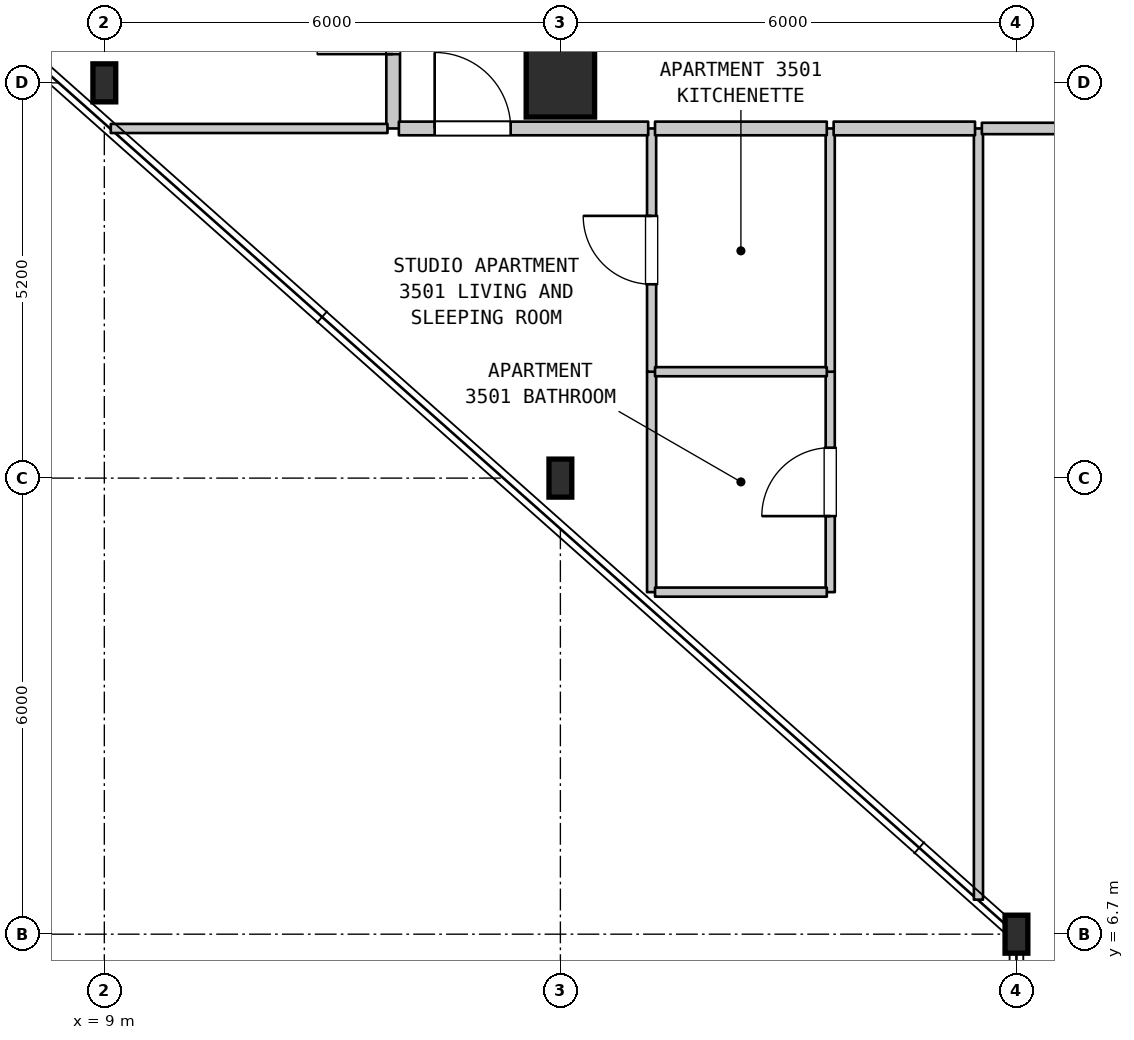
"""IFC4 building model, lengths in metres.
Left out: names, types, materials, properties, quantities, classifications, styles, units other than length and angle.
Written with IfcOpenShell. Run it as: python <this file> out.ifc"""

import sys

from ifc_helpers import new_model, si_unit, direction, frame, frame_2d, origin, origin_2d, place, context, subcontext, project, spatial, rectangle, i_section, extrude, element, fill, save


model = new_model("IFC4")
c1 = context("Model", 3, precision=1e-05, world=origin(), true_north=direction((0.0, 1.0)))
c2 = subcontext(c1, "Body", "Model", "MODEL_VIEW")
j1 = project(units=[si_unit("LENGTHUNIT", "METRE"), si_unit("PLANEANGLEUNIT", "RADIAN")], contexts=[c1])
p1 = place(None, origin())
s1 = spatial("IfcSite", under=j1, at=p1, CompositionType="ELEMENT")
p2 = place(p1, origin())
s2 = spatial("IfcBuilding", under=s1, at=p2, CompositionType="ELEMENT")
p3 = place(p2, frame((0.0, 0.0, 144.6)))
s3 = spatial("IfcBuildingStorey", under=s2, at=p3, CompositionType="ELEMENT", Elevation=144.6)
for number, where, z_axis, x_axis in (
    (1, (9.0, 17.9, 0.0), (0.0, 0.0, 1.0), (1.0, 0.0, 0.0)),
    (2, (15.0, 12.7, 0.0), (0.0, 0.0, 1.0), (1.0, 0.0, 0.0)),
):
    element("IfcColumn", number, at=place(p3, frame(where, z_axis=z_axis, x_axis=x_axis)), inside=s3, PredefinedType="COLUMN", context=c2, shape_type="SweptSolid", body=[
        extrude(i_section(OverallWidth=0.3, OverallDepth=0.5, WebThickness=0.014, FlangeThickness=0.028, FilletRadius=0.027, at=origin_2d()), origin(), (0.0, 0.0, 1.0), 3.7),
    ])
p4 = place(p3, frame((15.0, 17.9, 0.0), z_axis=(0.0, 0.0, 1.0), x_axis=(1.0, 0.0, 0.0)))
e3 = element("IfcColumn", 3, at=p4, inside=s3, PredefinedType="COLUMN", context=c2, shape_type="SweptSolid", body=[
    extrude(rectangle(XDim=0.9, YDim=0.9, at=origin_2d()), origin(), (0.0, 0.0, 1.0), 3.7),
])
p5 = place(p3, frame((21.0, 6.7, 0.0), z_axis=(0.0, 0.0, 1.0), x_axis=(1.0, 0.0, 0.0)))
e4 = element("IfcColumn", 4, at=p5, inside=s3, PredefinedType="COLUMN", context=c2, shape_type="SweptSolid", body=[
    extrude(i_section(OverallWidth=0.3, OverallDepth=0.5, WebThickness=0.014, FlangeThickness=0.028, FilletRadius=0.027, at=origin_2d()), origin(), (0.0, 0.0, 1.0), 3.7),
])
p6 = place(p3, frame((12.8, 17.3, 0.0), z_axis=(0.0, 0.0, 1.0), x_axis=(0.0, 1.0, 0.0)))
e5 = element("IfcWall", 5, at=p6, inside=s3, PredefinedType="STANDARD", context=c2, shape_type="SweptSolid", body=[
    extrude(rectangle(XDim=3.1, YDim=0.18, at=frame_2d((1.55, 0.0))), origin(), (0.0, 0.0, 1.0), 3.385),
])
p7 = place(p6, frame((0.978, 0.0, 0.0)))
e6 = element("IfcOpeningElement", 6, at=p7, cuts=e5, PredefinedType="OPENING", context=c2, shape_type="SweptSolid", body=[
    extrude(rectangle(XDim=1.0, YDim=2.15, at=frame_2d((0.5, 1.075))), frame((0.0, 0.1, 0.0), z_axis=(0.0, -1.0, 0.0), x_axis=(1.0, 0.0, 0.0)), (0.0, 0.0, 1.0), 0.2),
])
p8 = place(p3, frame((16.2, 11.2, 0.0), z_axis=(0.0, 0.0, 1.0), x_axis=(0.0, 1.0, 0.0)))
e7 = element("IfcWall", 7, at=p8, inside=s3, PredefinedType="PARTITIONING", context=c2, shape_type="SweptSolid", body=[
    extrude(rectangle(XDim=2.9, YDim=0.12, at=frame_2d((1.45, 0.0))), origin(), (0.0, 0.0, 1.0), 3.385),
])
p9 = place(p3, frame((16.2, 14.1, 0.0), z_axis=(0.0, 0.0, 1.0), x_axis=(0.0, 1.0, 0.0)))
e8 = element("IfcWall", 8, at=p9, inside=s3, PredefinedType="PARTITIONING", context=c2, shape_type="SweptSolid", body=[
    extrude(rectangle(XDim=3.2, YDim=0.12, at=frame_2d((1.6, 0.0))), origin(), (0.0, 0.0, 1.0), 3.385),
])
p10 = place(p9, frame((1.15, 0.0, 0.0)))
e9 = element("IfcOpeningElement", 9, at=p10, cuts=e8, PredefinedType="OPENING", context=c2, shape_type="SweptSolid", body=[
    extrude(rectangle(XDim=0.9, YDim=2.15, at=frame_2d((0.45, 1.075))), frame((0.0, 0.07, 0.0), z_axis=(0.0, -1.0, 0.0), x_axis=(1.0, 0.0, 0.0)), (0.0, 0.0, 1.0), 0.14),
])
p11 = place(p3, frame((18.55, 11.2, 0.0), z_axis=(0.0, 0.0, 1.0), x_axis=(0.0, 1.0, 0.0)))
e10 = element("IfcWall", 10, at=p11, inside=s3, PredefinedType="PARTITIONING", context=c2, shape_type="SweptSolid", body=[
    extrude(rectangle(XDim=2.9, YDim=0.12, at=frame_2d((1.45, 0.0))), origin(), (0.0, 0.0, 1.0), 3.385),
])
p12 = place(p11, frame((1.0, 0.0, 0.0)))
e11 = element("IfcOpeningElement", 11, at=p12, cuts=e10, PredefinedType="OPENING", context=c2, shape_type="SweptSolid", body=[
    extrude(rectangle(XDim=0.9, YDim=2.1, at=frame_2d((0.45, 1.05))), frame((0.0, 0.07, 0.0), z_axis=(0.0, -1.0, 0.0), x_axis=(1.0, 0.0, 0.0)), (0.0, 0.0, 1.0), 0.14),
])
p13 = place(p3, frame((18.55, 14.1, 0.0), z_axis=(0.0, 0.0, 1.0), x_axis=(0.0, 1.0, 0.0)))
e12 = element("IfcWall", 12, at=p13, inside=s3, PredefinedType="PARTITIONING", context=c2, shape_type="SweptSolid", body=[
    extrude(rectangle(XDim=3.2, YDim=0.12, at=frame_2d((1.6, 0.0))), origin(), (0.0, 0.0, 1.0), 3.385),
])
p14 = place(p3, frame((20.5, 7.154, 0.0), z_axis=(0.0, 0.0, 1.0), x_axis=(0.0, 1.0, 0.0)))
e13 = element("IfcWall", 13, at=p14, inside=s3, PredefinedType="PARTITIONING", context=c2, shape_type="SweptSolid", body=[
    extrude(rectangle(XDim=10.146, YDim=0.12, at=frame_2d((5.073, 0.0))), origin(), (0.0, 0.0, 1.0), 3.385),
])
for number, where, z_axis, x_axis in (
    (14, (16.245, 11.2, 0.0), (0.0, 0.0, 1.0), (1.0, 0.0, 0.0)),
    (15, (16.245, 14.1, 0.0), (0.0, 0.0, 1.0), (1.0, 0.0, 0.0)),
):
    element("IfcWall", number, at=place(p3, frame(where, z_axis=z_axis, x_axis=x_axis)), inside=s3, PredefinedType="PARTITIONING", context=c2, shape_type="SweptSolid", body=[
        extrude(rectangle(XDim=2.26, YDim=0.12, at=frame_2d((1.13, 0.0))), origin(), (0.0, 0.0, 1.0), 3.385),
    ])
p15 = place(p3, frame((9.085, 17.3, 0.0), z_axis=(0.0, 0.0, 1.0), x_axis=(1.0, 0.0, 0.0)))
e16 = element("IfcWall", 16, at=p15, inside=s3, PredefinedType="PARTITIONING", context=c2, shape_type="SweptSolid", body=[
    extrude(rectangle(XDim=3.64, YDim=0.12, at=frame_2d((1.82, 0.0))), origin(), (0.0, 0.0, 1.0), 3.385),
])
p16 = place(p3, frame((12.875, 17.3, 0.0), z_axis=(0.0, 0.0, 1.0), x_axis=(1.0, 0.0, 0.0)))
e17 = element("IfcWall", 17, at=p16, inside=s3, PredefinedType="STANDARD", context=c2, shape_type="SweptSolid", body=[
    extrude(rectangle(XDim=3.28, YDim=0.18, at=frame_2d((1.64, 0.0))), origin(), (0.0, 0.0, 1.0), 3.385),
])
p17 = place(p16, frame((0.471, 0.0, 0.0)))
e18 = element("IfcOpeningElement", 18, at=p17, cuts=e17, PredefinedType="OPENING", context=c2, shape_type="SweptSolid", body=[
    extrude(rectangle(XDim=1.0, YDim=2.15, at=frame_2d((0.5, 1.075))), frame((0.0, 0.1, 0.0), z_axis=(0.0, -1.0, 0.0), x_axis=(1.0, 0.0, 0.0)), (0.0, 0.0, 1.0), 0.2),
])
p18 = place(p3, frame((16.245, 17.3, 0.0), z_axis=(0.0, 0.0, 1.0), x_axis=(1.0, 0.0, 0.0)))
e19 = element("IfcWall", 19, at=p18, inside=s3, PredefinedType="STANDARD", context=c2, shape_type="SweptSolid", body=[
    extrude(rectangle(XDim=2.26, YDim=0.18, at=frame_2d((1.13, 0.0))), origin(), (0.0, 0.0, 1.0), 3.385),
])
p19 = place(p3, frame((18.595, 17.3, 0.0), z_axis=(0.0, 0.0, 1.0), x_axis=(1.0, 0.0, 0.0)))
e20 = element("IfcWall", 20, at=p19, inside=s3, PredefinedType="STANDARD", context=c2, shape_type="SweptSolid", body=[
    extrude(rectangle(XDim=1.86, YDim=0.18, at=frame_2d((0.93, 0.0))), origin(), (0.0, 0.0, 1.0), 3.385),
])
p20 = place(p3, frame((20.545, 17.3, 0.0), z_axis=(0.0, 0.0, 1.0), x_axis=(1.0, 0.0, 0.0)))
e21 = element("IfcWall", 21, at=p20, inside=s3, PredefinedType="STANDARD", context=c2, shape_type="SweptSolid", body=[
    extrude(rectangle(XDim=4.91, YDim=0.15, at=frame_2d((2.455, 0.0))), origin(), (0.0, 0.0, 1.0), 3.385),
])
p21 = place(p20, frame((1.884, 0.0, 0.0)))
e22 = element("IfcOpeningElement", 22, at=p21, cuts=e21, PredefinedType="OPENING", context=c2, shape_type="SweptSolid", body=[
    extrude(rectangle(XDim=1.0, YDim=2.15, at=frame_2d((0.5, 1.075))), frame((0.0, 0.085, 0.0), z_axis=(0.0, -1.0, 0.0), x_axis=(1.0, 0.0, 0.0)), (0.0, 0.0, 1.0), 0.17),
])
p22 = place(p7, origin())
e23 = element("IfcDoor", 23, at=p22, inside=s3, OperationType="SINGLE_SWING_LEFT", PredefinedType="DOOR", context=c2, shape_type="SweptSolid", body=[
    extrude(rectangle(XDim=1.0, YDim=2.15, at=frame_2d((0.5, 1.075))), frame((0.0, 0.025, 0.0), z_axis=(0.0, -1.0, 0.0), x_axis=(1.0, 0.0, 0.0)), (0.0, 0.0, 1.0), 0.05),
])
fill(e6, e23)
p23 = place(p10, origin())
e24 = element("IfcDoor", 24, at=p23, inside=s3, OperationType="SINGLE_SWING_RIGHT", PredefinedType="DOOR", context=c2, shape_type="SweptSolid", body=[
    extrude(rectangle(XDim=0.9, YDim=2.15, at=frame_2d((0.45, 1.075))), frame((0.0, 0.025, 0.0), z_axis=(0.0, -1.0, 0.0), x_axis=(1.0, 0.0, 0.0)), (0.0, 0.0, 1.0), 0.05),
])
fill(e9, e24)
p24 = place(p12, origin())
e25 = element("IfcDoor", 25, at=p24, inside=s3, OperationType="SINGLE_SWING_LEFT", PredefinedType="DOOR", context=c2, shape_type="SweptSolid", body=[
    extrude(rectangle(XDim=0.9, YDim=2.1, at=frame_2d((0.45, 1.05))), frame((0.0, 0.025, 0.0), z_axis=(0.0, -1.0, 0.0), x_axis=(1.0, 0.0, 0.0)), (0.0, 0.0, 1.0), 0.05),
])
fill(e11, e25)
p25 = place(p17, origin())
e26 = element("IfcDoor", 26, at=p25, inside=s3, OperationType="SINGLE_SWING_LEFT", PredefinedType="DOOR", context=c2, shape_type="SweptSolid", body=[
    extrude(rectangle(XDim=1.0, YDim=2.15, at=frame_2d((0.5, 1.075))), frame((0.0, 0.025, 0.0), z_axis=(0.0, -1.0, 0.0), x_axis=(1.0, 0.0, 0.0)), (0.0, 0.0, 1.0), 0.05),
])
fill(e18, e26)
save(model, sys.argv[1])
